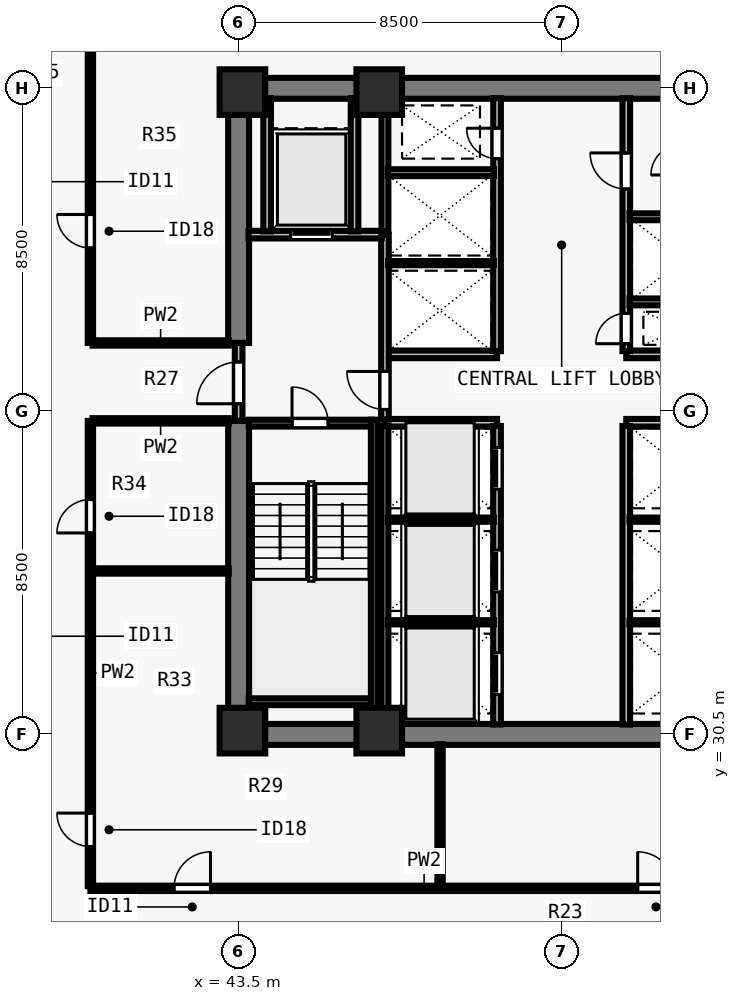
"""IFC4 building model, lengths in metres.
Left out: names, types, materials, properties, quantities, classifications, styles, units other than length and angle.
Written with IfcOpenShell. Run it as: python <this file> out.ifc"""

import sys

from ifc_helpers import new_model, si_unit, direction, frame, frame_2d, origin, origin_2d, place, context, subcontext, project, spatial, rectangle, extrude, element, fill, save


model = new_model("IFC4")
c1 = context("Model", 3, precision=1e-05, world=origin(), true_north=direction((0.0, 1.0)))
c2 = subcontext(c1, "Body", "Model", "MODEL_VIEW")
j1 = project(units=[si_unit("LENGTHUNIT", "METRE"), si_unit("PLANEANGLEUNIT", "RADIAN")], contexts=[c1])
p1 = place(None, origin())
s1 = spatial("IfcSite", under=j1, at=p1, CompositionType="ELEMENT")
p2 = place(p1, origin())
s2 = spatial("IfcBuilding", under=s1, at=p2, CompositionType="ELEMENT")
p3 = place(p2, frame((0.0, 0.0, 58.5)))
s3 = spatial("IfcBuildingStorey", under=s2, at=p3, CompositionType="ELEMENT", Elevation=58.5)
for number, where, z_axis, x_axis in (
    (1, (43.6, 30.6, 0.0), (0.0, 0.0, 1.0), (1.0, 0.0, 0.0)),
    (2, (47.2, 30.6, 0.0), (0.0, 0.0, 1.0), (1.0, 0.0, 0.0)),
    (3, (43.6, 47.4, 0.0), (0.0, 0.0, 1.0), (1.0, 0.0, 0.0)),
    (4, (47.2, 47.4, 0.0), (0.0, 0.0, 1.0), (1.0, 0.0, 0.0)),
):
    element("IfcColumn", number, at=place(p3, frame(where, z_axis=z_axis, x_axis=x_axis)), inside=s3, PredefinedType="COLUMN", context=c2, shape_type="SweptSolid", body=[
        extrude(rectangle(XDim=1.2, YDim=1.2, at=origin_2d()), origin(), (0.0, 0.0, 1.0), 3.5),
    ])
for number, where, z_axis, x_axis in (
    (5, (43.225, 30.5, 0.0), (0.0, 0.0, 1.0), (1.0, 0.0, 0.0)),
    (6, (43.225, 47.5, 0.0), (0.0, 0.0, 1.0), (1.0, 0.0, 0.0)),
):
    element("IfcWall", number, at=place(p3, frame(where, z_axis=z_axis, x_axis=x_axis)), inside=s3, PredefinedType="SHEAR", context=c2, shape_type="SweptSolid", body=[
        extrude(rectangle(XDim=17.55, YDim=0.55, at=frame_2d((8.775, 0.0))), origin(), (0.0, 0.0, 1.0), 3.28),
    ])
p4 = place(p3, frame((43.5, 30.765, 0.0), z_axis=(0.0, 0.0, 1.0), x_axis=(0.0, 1.0, 0.0)))
e7 = element("IfcWall", 7, at=p4, inside=s3, PredefinedType="SHEAR", context=c2, shape_type="SweptSolid", body=[
    extrude(rectangle(XDim=7.985, YDim=0.55, at=frame_2d((3.993, 0.0))), origin(), (0.0, 0.0, 1.0), 3.28),
])
p5 = place(p3, frame((43.5, 40.8, 0.0), z_axis=(0.0, 0.0, 1.0), x_axis=(0.0, 1.0, 0.0)))
e8 = element("IfcWall", 8, at=p5, inside=s3, PredefinedType="SHEAR", context=c2, shape_type="SweptSolid", body=[
    extrude(rectangle(XDim=6.435, YDim=0.55, at=frame_2d((3.218, 0.0))), origin(), (0.0, 0.0, 1.0), 3.28),
])
for number, where, z_axis, x_axis in (
    (9, (47.35, 38.7, 0.0), (0.0, 0.0, 1.0), (1.0, 0.0, 0.0)),
    (10, (47.35, 40.5, 0.0), (0.0, 0.0, 1.0), (1.0, 0.0, 0.0)),
    (11, (53.7, 38.7, 0.0), (0.0, 0.0, 1.0), (1.0, 0.0, 0.0)),
    (12, (53.7, 40.5, 0.0), (0.0, 0.0, 1.0), (1.0, 0.0, 0.0)),
):
    element("IfcWall", number, at=place(p3, frame(where, z_axis=z_axis, x_axis=x_axis)), inside=s3, PredefinedType="SOLIDWALL", context=c2, shape_type="SweptSolid", body=[
        extrude(rectangle(XDim=2.95, YDim=0.2, at=frame_2d((1.475, 0.0))), origin(), (0.0, 0.0, 1.0), 3.28),
    ])
p6 = place(p3, frame((50.3, 30.76, 0.0), z_axis=(0.0, 0.0, 1.0), x_axis=(0.0, 1.0, 0.0)))
e13 = element("IfcWall", 13, at=p6, inside=s3, PredefinedType="SOLIDWALL", context=c2, shape_type="SweptSolid", body=[
    extrude(rectangle(XDim=7.855, YDim=0.2, at=frame_2d((3.927, 0.0))), origin(), (0.0, 0.0, 1.0), 3.28),
])
p7 = place(p6, frame((0.79, 0.0, 0.0)))
e14 = element("IfcOpeningElement", 14, at=p7, cuts=e13, PredefinedType="OPENING", context=c2, shape_type="SweptSolid", body=[
    extrude(rectangle(XDim=1.1, YDim=2.2, at=frame_2d((0.55, 1.1))), frame((0.0, 0.11, 0.0), z_axis=(0.0, -1.0, 0.0), x_axis=(1.0, 0.0, 0.0)), (0.0, 0.0, 1.0), 0.22),
])
p8 = place(p6, frame((3.49, 0.0, 0.0)))
e15 = element("IfcOpeningElement", 15, at=p8, cuts=e13, PredefinedType="OPENING", context=c2, shape_type="SweptSolid", body=[
    extrude(rectangle(XDim=1.1, YDim=2.2, at=frame_2d((0.55, 1.1))), frame((0.0, 0.11, 0.0), z_axis=(0.0, -1.0, 0.0), x_axis=(1.0, 0.0, 0.0)), (0.0, 0.0, 1.0), 0.22),
])
p9 = place(p6, frame((6.19, 0.0, 0.0)))
e16 = element("IfcOpeningElement", 16, at=p9, cuts=e13, PredefinedType="OPENING", context=c2, shape_type="SweptSolid", body=[
    extrude(rectangle(XDim=1.1, YDim=2.2, at=frame_2d((0.55, 1.1))), frame((0.0, 0.11, 0.0), z_axis=(0.0, -1.0, 0.0), x_axis=(1.0, 0.0, 0.0)), (0.0, 0.0, 1.0), 0.22),
])
p10 = place(p3, frame((53.7, 30.76, 0.0), z_axis=(0.0, 0.0, 1.0), x_axis=(0.0, 1.0, 0.0)))
e17 = element("IfcWall", 17, at=p10, inside=s3, PredefinedType="SOLIDWALL", context=c2, shape_type="SweptSolid", body=[
    extrude(rectangle(XDim=7.855, YDim=0.2, at=frame_2d((3.927, 0.0))), origin(), (0.0, 0.0, 1.0), 3.28),
])
p11 = place(p3, frame((50.3, 40.585, 0.0), z_axis=(0.0, 0.0, 1.0), x_axis=(0.0, 1.0, 0.0)))
e18 = element("IfcWall", 18, at=p11, inside=s3, PredefinedType="SOLIDWALL", context=c2, shape_type="SweptSolid", body=[
    extrude(rectangle(XDim=6.655, YDim=0.2, at=frame_2d((3.328, 0.0))), origin(), (0.0, 0.0, 1.0), 3.28),
])
p12 = place(p11, frame((5.065, 0.0, 0.0)))
e19 = element("IfcOpeningElement", 19, at=p12, cuts=e18, PredefinedType="OPENING", context=c2, shape_type="SweptSolid", body=[
    extrude(rectangle(XDim=0.8, YDim=2.08, at=frame_2d((0.4, 1.04))), frame((0.0, 0.11, 0.0), z_axis=(0.0, -1.0, 0.0), x_axis=(1.0, 0.0, 0.0)), (0.0, 0.0, 1.0), 0.22),
])
p13 = place(p3, frame((53.7, 40.585, 0.0), z_axis=(0.0, 0.0, 1.0), x_axis=(0.0, 1.0, 0.0)))
e20 = element("IfcWall", 20, at=p13, inside=s3, PredefinedType="SOLIDWALL", context=c2, shape_type="SweptSolid", body=[
    extrude(rectangle(XDim=6.655, YDim=0.2, at=frame_2d((3.328, 0.0))), origin(), (0.0, 0.0, 1.0), 3.28),
])
p14 = place(p13, frame((0.195, 0.0, 0.0)))
e21 = element("IfcOpeningElement", 21, at=p14, cuts=e20, PredefinedType="OPENING", context=c2, shape_type="SweptSolid", body=[
    extrude(rectangle(XDim=0.8, YDim=2.08, at=frame_2d((0.4, 1.04))), frame((0.0, 0.11, 0.0), z_axis=(0.0, -1.0, 0.0), x_axis=(1.0, 0.0, 0.0)), (0.0, 0.0, 1.0), 0.22),
])
p15 = place(p13, frame((4.265, 0.0, 0.0)))
e22 = element("IfcOpeningElement", 22, at=p15, cuts=e20, PredefinedType="OPENING", context=c2, shape_type="SweptSolid", body=[
    extrude(rectangle(XDim=0.95, YDim=2.12, at=frame_2d((0.475, 1.06))), frame((0.0, 0.11, 0.0), z_axis=(0.0, -1.0, 0.0), x_axis=(1.0, 0.0, 0.0)), (0.0, 0.0, 1.0), 0.22),
])
p16 = place(p3, frame((43.5, 38.75, 0.0), z_axis=(0.0, 0.0, 1.0), x_axis=(0.0, 1.0, 0.0)))
e23 = element("IfcWall", 23, at=p16, inside=s3, PredefinedType="SOLIDWALL", context=c2, shape_type="SweptSolid", body=[
    extrude(rectangle(XDim=2.05, YDim=0.2, at=frame_2d((1.025, 0.0))), origin(), (0.0, 0.0, 1.0), 3.28),
])
p17 = place(p16, frame((0.45, 0.0, 0.0)))
e24 = element("IfcOpeningElement", 24, at=p17, cuts=e23, PredefinedType="OPENING", context=c2, shape_type="SweptSolid", body=[
    extrude(rectangle(XDim=1.1, YDim=2.15, at=frame_2d((0.55, 1.075))), frame((0.0, 0.11, 0.0), z_axis=(0.0, -1.0, 0.0), x_axis=(1.0, 0.0, 0.0)), (0.0, 0.0, 1.0), 0.22),
])
p18 = place(p3, frame((47.35, 38.785, 0.0), z_axis=(0.0, 0.0, 1.0), x_axis=(0.0, 1.0, 0.0)))
e25 = element("IfcWall", 25, at=p18, inside=s3, PredefinedType="SOLIDWALL", context=c2, shape_type="SweptSolid", body=[
    extrude(rectangle(XDim=4.865, YDim=0.2, at=frame_2d((2.433, 0.0))), origin(), (0.0, 0.0, 1.0), 3.28),
])
p19 = place(p18, frame((0.265, 0.0, 0.0)))
e26 = element("IfcOpeningElement", 26, at=p19, cuts=e25, PredefinedType="OPENING", context=c2, shape_type="SweptSolid", body=[
    extrude(rectangle(XDim=1.0, YDim=2.15, at=frame_2d((0.5, 1.075))), frame((0.0, 0.11, 0.0), z_axis=(0.0, -1.0, 0.0), x_axis=(1.0, 0.0, 0.0)), (0.0, 0.0, 1.0), 0.22),
])
p20 = place(p3, frame((43.76, 43.65, 0.0), z_axis=(0.0, 0.0, 1.0), x_axis=(1.0, 0.0, 0.0)))
e27 = element("IfcWall", 27, at=p20, inside=s3, PredefinedType="SOLIDWALL", context=c2, shape_type="SweptSolid", body=[
    extrude(rectangle(XDim=3.505, YDim=0.2, at=frame_2d((1.752, 0.0))), origin(), (0.0, 0.0, 1.0), 3.28),
])
p21 = place(p20, frame((1.11, 0.0, 0.0)))
e28 = element("IfcOpeningElement", 28, at=p21, cuts=e27, PredefinedType="OPENING", context=c2, shape_type="SweptSolid", body=[
    extrude(rectangle(XDim=1.1, YDim=2.2, at=frame_2d((0.55, 1.1))), frame((0.0, 0.11, 0.0), z_axis=(0.0, -1.0, 0.0), x_axis=(1.0, 0.0, 0.0)), (0.0, 0.0, 1.0), 0.22),
])
for number, where, z_axis, x_axis in (
    (29, (46.55, 43.735, 0.0), (0.0, 0.0, 1.0), (0.0, 1.0, 0.0)),
    (30, (44.25, 43.735, 0.0), (0.0, 0.0, 1.0), (0.0, 1.0, 0.0)),
):
    element("IfcWall", number, at=place(p3, frame(where, z_axis=z_axis, x_axis=x_axis)), inside=s3, PredefinedType="SOLIDWALL", context=c2, shape_type="SweptSolid", body=[
        extrude(rectangle(XDim=3.505, YDim=0.2, at=frame_2d((1.752, 0.0))), origin(), (0.0, 0.0, 1.0), 3.28),
    ])
p22 = place(p3, frame((47.35, 30.76, 0.0), z_axis=(0.0, 0.0, 1.0), x_axis=(0.0, 1.0, 0.0)))
e31 = element("IfcWall", 31, at=p22, inside=s3, PredefinedType="SOLIDWALL", context=c2, shape_type="SweptSolid", body=[
    extrude(rectangle(XDim=7.855, YDim=0.18, at=frame_2d((3.927, 0.0))), origin(), (0.0, 0.0, 1.0), 3.28),
])
for number, where, z_axis, x_axis in (
    (32, (47.425, 33.45, 0.0), (0.0, 0.0, 1.0), (1.0, 0.0, 0.0)),
    (33, (47.425, 36.15, 0.0), (0.0, 0.0, 1.0), (1.0, 0.0, 0.0)),
    (34, (53.785, 33.45, 0.0), (0.0, 0.0, 1.0), (1.0, 0.0, 0.0)),
    (35, (53.785, 36.15, 0.0), (0.0, 0.0, 1.0), (1.0, 0.0, 0.0)),
):
    element("IfcWall", number, at=place(p3, frame(where, z_axis=z_axis, x_axis=x_axis)), inside=s3, PredefinedType="PARTITIONING", context=c2, shape_type="SweptSolid", body=[
        extrude(rectangle(XDim=2.79, YDim=0.11, at=frame_2d((1.395, 0.0))), origin(), (0.0, 0.0, 1.0), 3.28),
    ])
p23 = place(p3, frame((47.35, 43.735, 0.0), z_axis=(0.0, 0.0, 1.0), x_axis=(0.0, 1.0, 0.0)))
e36 = element("IfcWall", 36, at=p23, inside=s3, PredefinedType="SOLIDWALL", context=c2, shape_type="SweptSolid", body=[
    extrude(rectangle(XDim=3.505, YDim=0.18, at=frame_2d((1.752, 0.0))), origin(), (0.0, 0.0, 1.0), 3.28),
])
p24 = place(p3, frame((47.435, 42.9, 0.0), z_axis=(0.0, 0.0, 1.0), x_axis=(1.0, 0.0, 0.0)))
e37 = element("IfcWall", 37, at=p24, inside=s3, PredefinedType="PARTITIONING", context=c2, shape_type="SweptSolid", body=[
    extrude(rectangle(XDim=2.78, YDim=0.11, at=frame_2d((1.39, 0.0))), origin(), (0.0, 0.0, 1.0), 3.28),
])
p25 = place(p3, frame((47.425, 45.28, 0.0), z_axis=(0.0, 0.0, 1.0), x_axis=(1.0, 0.0, 0.0)))
e38 = element("IfcWall", 38, at=p25, inside=s3, PredefinedType="SOLIDWALL", context=c2, shape_type="SweptSolid", body=[
    extrude(rectangle(XDim=2.79, YDim=0.18, at=frame_2d((1.395, 0.0))), origin(), (0.0, 0.0, 1.0), 3.28),
])
p26 = place(p3, frame((53.785, 41.88, 0.0), z_axis=(0.0, 0.0, 1.0), x_axis=(1.0, 0.0, 0.0)))
e39 = element("IfcWall", 39, at=p26, inside=s3, PredefinedType="SOLIDWALL", context=c2, shape_type="SweptSolid", body=[
    extrude(rectangle(XDim=2.78, YDim=0.18, at=frame_2d((1.39, 0.0))), origin(), (0.0, 0.0, 1.0), 3.28),
])
p27 = place(p3, frame((53.785, 44.12, 0.0), z_axis=(0.0, 0.0, 1.0), x_axis=(1.0, 0.0, 0.0)))
e40 = element("IfcWall", 40, at=p27, inside=s3, PredefinedType="SOLIDWALL", context=c2, shape_type="SweptSolid", body=[
    extrude(rectangle(XDim=2.79, YDim=0.18, at=frame_2d((1.395, 0.0))), origin(), (0.0, 0.0, 1.0), 3.28),
])
p28 = place(p3, frame((39.6, 26.45, 0.0), z_axis=(0.0, 0.0, 1.0), x_axis=(1.0, 0.0, 0.0)))
e41 = element("IfcWall", 41, at=p28, inside=s3, PredefinedType="PARTITIONING", context=c2, shape_type="SweptSolid", body=[
    extrude(rectangle(XDim=24.8, YDim=0.14, at=frame_2d((12.4, 0.0))), origin(), (0.0, 0.0, 1.0), 3.28),
])
p29 = place(p28, frame((2.2, 0.0, 0.0)))
e42 = element("IfcOpeningElement", 42, at=p29, cuts=e41, PredefinedType="OPENING", context=c2, shape_type="SweptSolid", body=[
    extrude(rectangle(XDim=0.96, YDim=2.12, at=frame_2d((0.48, 1.06))), frame((0.0, 0.08, 0.0), z_axis=(0.0, -1.0, 0.0), x_axis=(1.0, 0.0, 0.0)), (0.0, 0.0, 1.0), 0.16),
])
p30 = place(p28, frame((14.4, 0.0, 0.0)))
e43 = element("IfcOpeningElement", 43, at=p30, cuts=e41, PredefinedType="OPENING", context=c2, shape_type="SweptSolid", body=[
    extrude(rectangle(XDim=0.96, YDim=2.12, at=frame_2d((0.48, 1.06))), frame((0.0, 0.08, 0.0), z_axis=(0.0, -1.0, 0.0), x_axis=(1.0, 0.0, 0.0)), (0.0, 0.0, 1.0), 0.16),
])
p31 = place(p3, frame((39.6, 26.505, 0.0), z_axis=(0.0, 0.0, 1.0), x_axis=(0.0, 1.0, 0.0)))
e44 = element("IfcWall", 44, at=p31, inside=s3, PredefinedType="PARTITIONING", context=c2, shape_type="SweptSolid", body=[
    extrude(rectangle(XDim=12.245, YDim=0.14, at=frame_2d((6.123, 0.0))), origin(), (0.0, 0.0, 1.0), 3.28),
])
p32 = place(p31, frame((1.045, 0.0, 0.0)))
e45 = element("IfcOpeningElement", 45, at=p32, cuts=e44, PredefinedType="OPENING", context=c2, shape_type="SweptSolid", body=[
    extrude(rectangle(XDim=0.88, YDim=2.1, at=frame_2d((0.44, 1.05))), frame((0.0, 0.08, 0.0), z_axis=(0.0, -1.0, 0.0), x_axis=(1.0, 0.0, 0.0)), (0.0, 0.0, 1.0), 0.16),
])
p33 = place(p31, frame((9.295, 0.0, 0.0)))
e46 = element("IfcOpeningElement", 46, at=p33, cuts=e44, PredefinedType="OPENING", context=c2, shape_type="SweptSolid", body=[
    extrude(rectangle(XDim=0.88, YDim=2.1, at=frame_2d((0.44, 1.05))), frame((0.0, 0.08, 0.0), z_axis=(0.0, -1.0, 0.0), x_axis=(1.0, 0.0, 0.0)), (0.0, 0.0, 1.0), 0.16),
])
p34 = place(p3, frame((39.6, 40.8, 0.0), z_axis=(0.0, 0.0, 1.0), x_axis=(0.0, 1.0, 0.0)))
e47 = element("IfcWall", 47, at=p34, inside=s3, PredefinedType="PARTITIONING", context=c2, shape_type="SweptSolid", body=[
    extrude(rectangle(XDim=10.695, YDim=0.14, at=frame_2d((5.348, 0.0))), origin(), (0.0, 0.0, 1.0), 3.28),
])
p35 = place(p34, frame((2.5, 0.0, 0.0)))
e48 = element("IfcOpeningElement", 48, at=p35, cuts=e47, PredefinedType="OPENING", context=c2, shape_type="SweptSolid", body=[
    extrude(rectangle(XDim=0.88, YDim=2.1, at=frame_2d((0.44, 1.05))), frame((0.0, 0.08, 0.0), z_axis=(0.0, -1.0, 0.0), x_axis=(1.0, 0.0, 0.0)), (0.0, 0.0, 1.0), 0.16),
])
for number, where, z_axis, x_axis in (
    (49, (39.655, 38.75, 0.0), (0.0, 0.0, 1.0), (1.0, 0.0, 0.0)),
    (50, (39.655, 40.8, 0.0), (0.0, 0.0, 1.0), (1.0, 0.0, 0.0)),
):
    element("IfcWall", number, at=place(p3, frame(where, z_axis=z_axis, x_axis=x_axis)), inside=s3, PredefinedType="PARTITIONING", context=c2, shape_type="SweptSolid", body=[
        extrude(rectangle(XDim=3.585, YDim=0.14, at=frame_2d((1.792, 0.0))), origin(), (0.0, 0.0, 1.0), 3.28),
    ])
p36 = place(p3, frame((48.8, 26.505, 0.0), z_axis=(0.0, 0.0, 1.0), x_axis=(0.0, 1.0, 0.0)))
e51 = element("IfcWall", 51, at=p36, inside=s3, PredefinedType="PARTITIONING", context=c2, shape_type="SweptSolid", body=[
    extrude(rectangle(XDim=3.735, YDim=0.14, at=frame_2d((1.868, 0.0))), origin(), (0.0, 0.0, 1.0), 3.28),
])
p37 = place(p3, frame((39.655, 34.8, 0.0), z_axis=(0.0, 0.0, 1.0), x_axis=(1.0, 0.0, 0.0)))
e52 = element("IfcWall", 52, at=p37, inside=s3, PredefinedType="PARTITIONING", context=c2, shape_type="SweptSolid", body=[
    extrude(rectangle(XDim=3.585, YDim=0.14, at=frame_2d((1.792, 0.0))), origin(), (0.0, 0.0, 1.0), 3.28),
])
p38 = place(p3, frame((43.765, 38.69, 0.0), z_axis=(0.0, 0.0, 1.0), x_axis=(1.0, 0.0, 0.0)))
e53 = element("IfcWall", 53, at=p38, inside=s3, PredefinedType="SOLIDWALL", context=c2, shape_type="SweptSolid", body=[
    extrude(rectangle(XDim=3.23, YDim=0.18, at=frame_2d((1.615, 0.0))), origin(), (0.0, 0.0, 1.0), 3.28),
])
p39 = place(p38, frame((1.14, 0.0, 0.0)))
e54 = element("IfcOpeningElement", 54, at=p39, cuts=e53, PredefinedType="OPENING", context=c2, shape_type="SweptSolid", body=[
    extrude(rectangle(XDim=0.95, YDim=2.15, at=frame_2d((0.475, 1.075))), frame((0.0, 0.1, 0.0), z_axis=(0.0, -1.0, 0.0), x_axis=(1.0, 0.0, 0.0)), (0.0, 0.0, 1.0), 0.2),
])
p40 = place(p3, frame((43.765, 31.36, 0.0), z_axis=(0.0, 0.0, 1.0), x_axis=(1.0, 0.0, 0.0)))
e55 = element("IfcWall", 55, at=p40, inside=s3, PredefinedType="SOLIDWALL", context=c2, shape_type="SweptSolid", body=[
    extrude(rectangle(XDim=3.23, YDim=0.18, at=frame_2d((1.615, 0.0))), origin(), (0.0, 0.0, 1.0), 3.28),
])
p41 = place(p3, frame((47.07, 38.78, 0.0), z_axis=(0.0, 0.0, 1.0), x_axis=(0.0, -1.0, 0.0)))
e56 = element("IfcWall", 56, at=p41, inside=s3, PredefinedType="SOLIDWALL", context=c2, shape_type="SweptSolid", body=[
    extrude(rectangle(XDim=8.017, YDim=0.18, at=frame_2d((4.009, 0.0))), origin(), (0.0, 0.0, 1.0), 3.28),
])
p42 = place(p17, origin())
e57 = element("IfcDoor", 57, at=p42, inside=s3, OperationType="SINGLE_SWING_LEFT", PredefinedType="DOOR", context=c2, shape_type="SweptSolid", body=[
    extrude(rectangle(XDim=1.1, YDim=2.15, at=frame_2d((0.55, 1.075))), frame((0.0, 0.025, 0.0), z_axis=(0.0, -1.0, 0.0), x_axis=(1.0, 0.0, 0.0)), (0.0, 0.0, 1.0), 0.05),
])
fill(e24, e57)
p43 = place(p19, origin())
e58 = element("IfcDoor", 58, at=p43, inside=s3, OperationType="SINGLE_SWING_RIGHT", PredefinedType="DOOR", context=c2, shape_type="SweptSolid", body=[
    extrude(rectangle(XDim=1.0, YDim=2.15, at=frame_2d((0.5, 1.075))), frame((0.0, 0.025, 0.0), z_axis=(0.0, -1.0, 0.0), x_axis=(1.0, 0.0, 0.0)), (0.0, 0.0, 1.0), 0.05),
])
fill(e26, e58)
p44 = place(p21, origin())
e59 = element("IfcDoor", 59, at=p44, inside=s3, OperationType="SLIDING_TO_LEFT", PredefinedType="DOOR", context=c2, shape_type="SweptSolid", body=[
    extrude(rectangle(XDim=1.1, YDim=2.2, at=frame_2d((0.55, 1.1))), frame((0.0, 0.025, 0.0), z_axis=(0.0, -1.0, 0.0), x_axis=(1.0, 0.0, 0.0)), (0.0, 0.0, 1.0), 0.05),
])
fill(e28, e59)
p45 = place(p7, origin())
e60 = element("IfcDoor", 60, at=p45, inside=s3, OperationType="SLIDING_TO_LEFT", PredefinedType="DOOR", context=c2, shape_type="SweptSolid", body=[
    extrude(rectangle(XDim=1.1, YDim=2.2, at=frame_2d((0.55, 1.1))), frame((0.0, 0.025, 0.0), z_axis=(0.0, -1.0, 0.0), x_axis=(1.0, 0.0, 0.0)), (0.0, 0.0, 1.0), 0.05),
])
fill(e14, e60)
p46 = place(p8, origin())
e61 = element("IfcDoor", 61, at=p46, inside=s3, OperationType="SLIDING_TO_LEFT", PredefinedType="DOOR", context=c2, shape_type="SweptSolid", body=[
    extrude(rectangle(XDim=1.1, YDim=2.2, at=frame_2d((0.55, 1.1))), frame((0.0, 0.025, 0.0), z_axis=(0.0, -1.0, 0.0), x_axis=(1.0, 0.0, 0.0)), (0.0, 0.0, 1.0), 0.05),
])
fill(e15, e61)
p47 = place(p9, origin())
e62 = element("IfcDoor", 62, at=p47, inside=s3, OperationType="SLIDING_TO_LEFT", PredefinedType="DOOR", context=c2, shape_type="SweptSolid", body=[
    extrude(rectangle(XDim=1.1, YDim=2.2, at=frame_2d((0.55, 1.1))), frame((0.0, 0.025, 0.0), z_axis=(0.0, -1.0, 0.0), x_axis=(1.0, 0.0, 0.0)), (0.0, 0.0, 1.0), 0.05),
])
fill(e16, e62)
p48 = place(p12, origin())
e63 = element("IfcDoor", 63, at=p48, inside=s3, OperationType="SINGLE_SWING_RIGHT", PredefinedType="DOOR", context=c2, shape_type="SweptSolid", body=[
    extrude(rectangle(XDim=0.8, YDim=2.08, at=frame_2d((0.4, 1.04))), frame((0.0, 0.025, 0.0), z_axis=(0.0, -1.0, 0.0), x_axis=(1.0, 0.0, 0.0)), (0.0, 0.0, 1.0), 0.05),
])
fill(e19, e63)
p49 = place(p14, origin())
e64 = element("IfcDoor", 64, at=p49, inside=s3, OperationType="SINGLE_SWING_LEFT", PredefinedType="DOOR", context=c2, shape_type="SweptSolid", body=[
    extrude(rectangle(XDim=0.8, YDim=2.08, at=frame_2d((0.4, 1.04))), frame((0.0, 0.025, 0.0), z_axis=(0.0, -1.0, 0.0), x_axis=(1.0, 0.0, 0.0)), (0.0, 0.0, 1.0), 0.05),
])
fill(e21, e64)
p50 = place(p15, origin())
e65 = element("IfcDoor", 65, at=p50, inside=s3, OperationType="SINGLE_SWING_RIGHT", PredefinedType="DOOR", context=c2, shape_type="SweptSolid", body=[
    extrude(rectangle(XDim=0.95, YDim=2.12, at=frame_2d((0.475, 1.06))), frame((0.0, 0.025, 0.0), z_axis=(0.0, -1.0, 0.0), x_axis=(1.0, 0.0, 0.0)), (0.0, 0.0, 1.0), 0.05),
])
fill(e22, e65)
p51 = place(p29, origin())
e66 = element("IfcDoor", 66, at=p51, inside=s3, OperationType="SINGLE_SWING_RIGHT", PredefinedType="DOOR", context=c2, shape_type="SweptSolid", body=[
    extrude(rectangle(XDim=0.96, YDim=2.12, at=frame_2d((0.48, 1.06))), frame((0.0, 0.025, 0.0), z_axis=(0.0, -1.0, 0.0), x_axis=(1.0, 0.0, 0.0)), (0.0, 0.0, 1.0), 0.05),
])
fill(e42, e66)
p52 = place(p30, origin())
e67 = element("IfcDoor", 67, at=p52, inside=s3, OperationType="SINGLE_SWING_LEFT", PredefinedType="DOOR", context=c2, shape_type="SweptSolid", body=[
    extrude(rectangle(XDim=0.96, YDim=2.12, at=frame_2d((0.48, 1.06))), frame((0.0, 0.025, 0.0), z_axis=(0.0, -1.0, 0.0), x_axis=(1.0, 0.0, 0.0)), (0.0, 0.0, 1.0), 0.05),
])
fill(e43, e67)
p53 = place(p32, origin())
e68 = element("IfcDoor", 68, at=p53, inside=s3, OperationType="SINGLE_SWING_RIGHT", PredefinedType="DOOR", context=c2, shape_type="SweptSolid", body=[
    extrude(rectangle(XDim=0.88, YDim=2.1, at=frame_2d((0.44, 1.05))), frame((0.0, 0.025, 0.0), z_axis=(0.0, -1.0, 0.0), x_axis=(1.0, 0.0, 0.0)), (0.0, 0.0, 1.0), 0.05),
])
fill(e45, e68)
p54 = place(p33, origin())
e69 = element("IfcDoor", 69, at=p54, inside=s3, OperationType="SINGLE_SWING_LEFT", PredefinedType="DOOR", context=c2, shape_type="SweptSolid", body=[
    extrude(rectangle(XDim=0.88, YDim=2.1, at=frame_2d((0.44, 1.05))), frame((0.0, 0.025, 0.0), z_axis=(0.0, -1.0, 0.0), x_axis=(1.0, 0.0, 0.0)), (0.0, 0.0, 1.0), 0.05),
])
fill(e46, e69)
p55 = place(p35, origin())
e70 = element("IfcDoor", 70, at=p55, inside=s3, OperationType="SINGLE_SWING_RIGHT", PredefinedType="DOOR", context=c2, shape_type="SweptSolid", body=[
    extrude(rectangle(XDim=0.88, YDim=2.1, at=frame_2d((0.44, 1.05))), frame((0.0, 0.025, 0.0), z_axis=(0.0, -1.0, 0.0), x_axis=(1.0, 0.0, 0.0)), (0.0, 0.0, 1.0), 0.05),
])
fill(e48, e70)
p56 = place(p39, origin())
e71 = element("IfcDoor", 71, at=p56, inside=s3, OperationType="SINGLE_SWING_LEFT", PredefinedType="DOOR", context=c2, shape_type="SweptSolid", body=[
    extrude(rectangle(XDim=0.95, YDim=2.15, at=frame_2d((0.475, 1.075))), frame((0.0, 0.025, 0.0), z_axis=(0.0, -1.0, 0.0), x_axis=(1.0, 0.0, 0.0)), (0.0, 0.0, 1.0), 0.05),
])
fill(e54, e71)
save(model, sys.argv[1])
